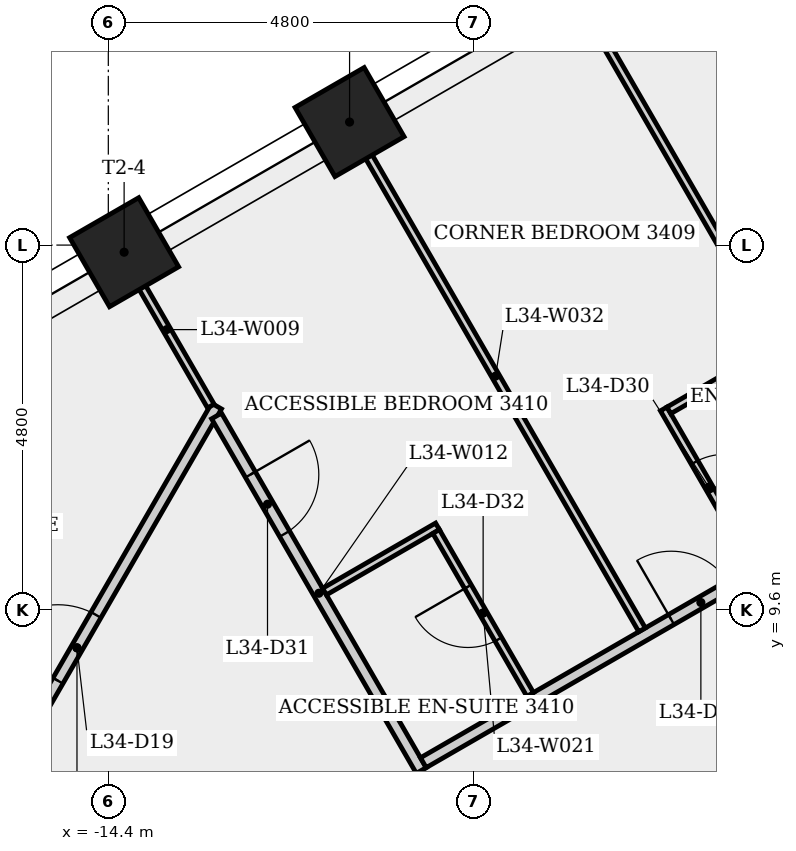
"""IFC4 building model, lengths in metres.
Left out: names, types, materials, properties, quantities, classifications, styles, units other than length and angle.
Written with IfcOpenShell. Run it as: python <this file> out.ifc"""

import sys

from ifc_helpers import new_model, si_unit, direction, frame, frame_2d, origin, origin_2d, place, context, subcontext, project, spatial, rectangle, extrude, element, fill, save


model = new_model("IFC4")
c1 = context("Model", 3, precision=1e-05, world=origin(), true_north=direction((0.0, 1.0)))
c2 = subcontext(c1, "Body", "Model", "MODEL_VIEW")
j1 = project(units=[si_unit("LENGTHUNIT", "METRE"), si_unit("PLANEANGLEUNIT", "RADIAN")], contexts=[c1])
p1 = place(None, origin())
s1 = spatial("IfcSite", under=j1, at=p1, CompositionType="ELEMENT")
p2 = place(p1, origin())
s2 = spatial("IfcBuilding", under=s1, at=p2, CompositionType="ELEMENT")
p3 = place(p2, frame((0.0, 0.0, 128.5)))
s3 = spatial("IfcBuildingStorey", under=s2, at=p3, CompositionType="ELEMENT", Elevation=128.5)
p4 = place(p3, frame((0.175, 10.667, 0.0), z_axis=(0.0, 0.0, 1.0), x_axis=(-0.866023993627, -0.500002442456, 0.0)))
e1 = element("IfcWall", 1, at=p4, inside=s3, PredefinedType="SHEAR", context=c2, shape_type="SweptSolid", body=[
    extrude(rectangle(XDim=10.97, YDim=0.7, at=frame_2d((5.485, 0.0))), origin(), (0.0, 0.0, 1.0), 4.0),
])
p5 = place(p4, frame((9.254, 0.0, 0.0)))
e2 = element("IfcOpeningElement", 2, at=p5, cuts=e1, PredefinedType="OPENING", context=c2, shape_type="SweptSolid", body=[
    extrude(rectangle(XDim=0.9, YDim=2.1, at=frame_2d((0.45, 1.05))), frame((0.0, 0.36, 0.0), z_axis=(0.0, -1.0, 0.0), x_axis=(1.0, 0.0, 0.0)), (0.0, 0.0, 1.0), 0.72),
])
p6 = place(p4, frame((2.033, 0.0, 0.0)))
e3 = element("IfcOpeningElement", 3, at=p6, cuts=e1, PredefinedType="OPENING", context=c2, shape_type="SweptSolid", body=[
    extrude(rectangle(XDim=0.9, YDim=2.1, at=frame_2d((0.45, 1.05))), frame((0.0, 0.36, 0.0), z_axis=(0.0, -1.0, 0.0), x_axis=(1.0, 0.0, 0.0)), (0.0, 0.0, 1.0), 0.72),
])
for number, where, z_axis, x_axis in (
    (4, (-11.226, 16.019, 0.0), (0.0, 0.0, 1.0), (-0.5, 0.866, 0.0)),
    (5, (-14.192, 14.306, 0.0), (0.0, 0.0, 1.0), (-0.5, 0.866, 0.0)),
):
    element("IfcColumn", number, at=place(p3, frame(where, z_axis=z_axis, x_axis=x_axis)), inside=s3, PredefinedType="COLUMN", context=c2, shape_type="SweptSolid", body=[
        extrude(rectangle(XDim=1.05, YDim=1.05, at=origin_2d()), origin(), (0.0, 0.0, 1.0), 4.0),
    ])
p7 = place(p3, frame((-16.649, 5.92, 0.0), z_axis=(0.0, 0.0, 1.0), x_axis=(0.500003458512, 0.866023407002, 0.0)))
e6 = element("IfcWall", 6, at=p7, inside=s3, PredefinedType="PARTITIONING", context=c2, shape_type="SweptSolid", body=[
    extrude(rectangle(XDim=7.345, YDim=0.15, at=frame_2d((3.673, 0.0))), origin(), (0.0, 0.0, 1.0), 3.65),
])
p8 = place(p7, frame((3.173, 0.0, 0.0)))
e7 = element("IfcOpeningElement", 7, at=p8, cuts=e6, PredefinedType="OPENING", context=c2, shape_type="SweptSolid", body=[
    extrude(rectangle(XDim=1.0, YDim=2.1, at=frame_2d((0.5, 1.05))), frame((0.0, 0.085, 0.0), z_axis=(0.0, -1.0, 0.0), x_axis=(1.0, 0.0, 0.0)), (0.0, 0.0, 1.0), 0.17),
])
p9 = place(p3, frame((-14.213, 14.294, 0.0), z_axis=(0.0, 0.0, 1.0), x_axis=(0.499946767237, -0.866056135553, 0.0)))
e8 = element("IfcWall", 8, at=p9, inside=s3, PredefinedType="PARTITIONING", context=c2, shape_type="SweptSolid", body=[
    extrude(rectangle(XDim=2.324, YDim=0.1, at=frame_2d((1.162, 0.0))), origin(), (0.0, 0.0, 1.0), 3.65),
])
p10 = place(p3, frame((-12.976, 12.152, 0.0), z_axis=(0.0, 0.0, 1.0), x_axis=(0.500019321912, -0.866014247986, 0.0)))
e9 = element("IfcWall", 9, at=p10, inside=s3, PredefinedType="PARTITIONING", context=c2, shape_type="SweptSolid", body=[
    extrude(rectangle(XDim=5.386, YDim=0.15, at=frame_2d((2.693, 0.0))), origin(), (0.0, 0.0, 1.0), 3.65),
])
p11 = place(p10, frame((0.891, 0.0, 0.0)))
e10 = element("IfcOpeningElement", 10, at=p11, cuts=e9, PredefinedType="OPENING", context=c2, shape_type="SweptSolid", body=[
    extrude(rectangle(XDim=0.9, YDim=2.1, at=frame_2d((0.45, 1.05))), frame((0.0, 0.085, 0.0), z_axis=(0.0, -1.0, 0.0), x_axis=(1.0, 0.0, 0.0)), (0.0, 0.0, 1.0), 0.17),
])
p12 = place(p3, frame((-10.255, 7.589, 0.0), z_axis=(0.0, 0.0, 1.0), x_axis=(0.866015055687, 0.500017923002, 0.0)))
e11 = element("IfcWall", 11, at=p12, inside=s3, PredefinedType="PARTITIONING", context=c2, shape_type="SweptSolid", body=[
    extrude(rectangle(XDim=10.323, YDim=0.15, at=frame_2d((5.162, 0.0))), origin(), (0.0, 0.0, 1.0), 3.65),
])
p13 = place(p12, frame((3.766, 0.0, 0.0)))
e12 = element("IfcOpeningElement", 12, at=p13, cuts=e11, PredefinedType="OPENING", context=c2, shape_type="SweptSolid", body=[
    extrude(rectangle(XDim=0.9, YDim=2.1, at=frame_2d((0.45, 1.05))), frame((0.0, 0.085, 0.0), z_axis=(0.0, -1.0, 0.0), x_axis=(1.0, 0.0, 0.0)), (0.0, 0.0, 1.0), 0.17),
])
p14 = place(p3, frame((-10.069, 10.699, 0.0), z_axis=(0.0, 0.0, 1.0), x_axis=(-0.865984193376, -0.500071371729, 0.0)))
e13 = element("IfcWall", 13, at=p14, inside=s3, PredefinedType="PARTITIONING", context=c2, shape_type="SweptSolid", body=[
    extrude(rectangle(XDim=1.716, YDim=0.1, at=frame_2d((0.858, 0.0))), origin(), (0.0, 0.0, 1.0), 3.65),
])
p15 = place(p3, frame((-8.85, 8.487, 0.0), z_axis=(0.0, 0.0, 1.0), x_axis=(-0.500032699561, 0.866006523861, 0.0)))
e14 = element("IfcWall", 14, at=p15, inside=s3, PredefinedType="PARTITIONING", context=c2, shape_type="SweptSolid", body=[
    extrude(rectangle(XDim=2.475, YDim=0.1, at=frame_2d((1.237, 0.0))), origin(), (0.0, 0.0, 1.0), 3.65),
])
p16 = place(p15, frame((0.837, 0.0, 0.0)))
e15 = element("IfcOpeningElement", 15, at=p16, cuts=e14, PredefinedType="OPENING", context=c2, shape_type="SweptSolid", body=[
    extrude(rectangle(XDim=0.8, YDim=2.1, at=frame_2d((0.4, 1.05))), frame((0.0, 0.06, 0.0), z_axis=(0.0, -1.0, 0.0), x_axis=(1.0, 0.0, 0.0)), (0.0, 0.0, 1.0), 0.12),
])
p17 = place(p3, frame((-7.378, 9.337, 0.0), z_axis=(0.0, 0.0, 1.0), x_axis=(-0.499997453958, 0.866026873738, 0.0)))
e16 = element("IfcWall", 16, at=p17, inside=s3, PredefinedType="PARTITIONING", context=c2, shape_type="SweptSolid", body=[
    extrude(rectangle(XDim=7.71, YDim=0.1, at=frame_2d((3.855, 0.0))), origin(), (0.0, 0.0, 1.0), 3.65),
])
p18 = place(p3, frame((-7.093, 12.244, 0.0), z_axis=(0.0, 0.0, 1.0), x_axis=(0.500030943131, -0.866007538022, 0.0)))
e17 = element("IfcWall", 17, at=p18, inside=s3, PredefinedType="PARTITIONING", context=c2, shape_type="SweptSolid", body=[
    extrude(rectangle(XDim=2.375, YDim=0.1, at=frame_2d((1.188, 0.0))), origin(), (0.0, 0.0, 1.0), 3.65),
])
p19 = place(p18, frame((0.812, 0.0, 0.0)))
e18 = element("IfcOpeningElement", 18, at=p19, cuts=e17, PredefinedType="OPENING", context=c2, shape_type="SweptSolid", body=[
    extrude(rectangle(XDim=0.8, YDim=2.1, at=frame_2d((0.4, 1.05))), frame((0.0, 0.06, 0.0), z_axis=(0.0, -1.0, 0.0), x_axis=(1.0, 0.0, 0.0)), (0.0, 0.0, 1.0), 0.12),
])
p20 = place(p3, frame((-5.603, 13.046, 0.0), z_axis=(0.0, 0.0, 1.0), x_axis=(-0.866009679343, -0.500027234542, 0.0)))
e19 = element("IfcWall", 19, at=p20, inside=s3, PredefinedType="PARTITIONING", context=c2, shape_type="SweptSolid", body=[
    extrude(rectangle(XDim=1.641, YDim=0.1, at=frame_2d((0.821, 0.0))), origin(), (0.0, 0.0, 1.0), 3.65),
])
p21 = place(p3, frame((-8.253, 17.735, 0.0), z_axis=(0.0, 0.0, 1.0), x_axis=(0.499983743644, -0.866034789193, 0.0)))
e20 = element("IfcWall", 20, at=p21, inside=s3, PredefinedType="PARTITIONING", context=c2, shape_type="SweptSolid", body=[
    extrude(rectangle(XDim=7.711, YDim=0.1, at=frame_2d((3.855, 0.0))), origin(), (0.0, 0.0, 1.0), 3.65),
])
p22 = place(p8, origin())
e21 = element("IfcDoor", 21, at=p22, inside=s3, OperationType="SINGLE_SWING_LEFT", PredefinedType="DOOR", context=c2, shape_type="SweptSolid", body=[
    extrude(rectangle(XDim=1.0, YDim=2.1, at=frame_2d((0.5, 1.05))), frame((0.0, 0.025, 0.0), z_axis=(0.0, -1.0, 0.0), x_axis=(1.0, 0.0, 0.0)), (0.0, 0.0, 1.0), 0.05),
])
fill(e7, e21)
p23 = place(p13, origin())
e22 = element("IfcDoor", 22, at=p23, inside=s3, OperationType="SINGLE_SWING_LEFT", PredefinedType="DOOR", context=c2, shape_type="SweptSolid", body=[
    extrude(rectangle(XDim=0.9, YDim=2.1, at=frame_2d((0.45, 1.05))), frame((0.0, 0.025, 0.0), z_axis=(0.0, -1.0, 0.0), x_axis=(1.0, 0.0, 0.0)), (0.0, 0.0, 1.0), 0.05),
])
fill(e12, e22)
p24 = place(p19, origin())
e23 = element("IfcDoor", 23, at=p24, inside=s3, OperationType="SINGLE_SWING_RIGHT", PredefinedType="DOOR", context=c2, shape_type="SweptSolid", body=[
    extrude(rectangle(XDim=0.8, YDim=2.1, at=frame_2d((0.4, 1.05))), frame((0.0, 0.025, 0.0), z_axis=(0.0, -1.0, 0.0), x_axis=(1.0, 0.0, 0.0)), (0.0, 0.0, 1.0), 0.05),
])
fill(e18, e23)
p25 = place(p11, origin())
e24 = element("IfcDoor", 24, at=p25, inside=s3, OperationType="SINGLE_SWING_LEFT", PredefinedType="DOOR", context=c2, shape_type="SweptSolid", body=[
    extrude(rectangle(XDim=0.9, YDim=2.1, at=frame_2d((0.45, 1.05))), frame((0.0, 0.025, 0.0), z_axis=(0.0, -1.0, 0.0), x_axis=(1.0, 0.0, 0.0)), (0.0, 0.0, 1.0), 0.05),
])
fill(e10, e24)
p26 = place(p16, origin())
e25 = element("IfcDoor", 25, at=p26, inside=s3, OperationType="SINGLE_SWING_RIGHT", PredefinedType="DOOR", context=c2, shape_type="SweptSolid", body=[
    extrude(rectangle(XDim=0.8, YDim=2.1, at=frame_2d((0.4, 1.05))), frame((0.0, 0.025, 0.0), z_axis=(0.0, -1.0, 0.0), x_axis=(1.0, 0.0, 0.0)), (0.0, 0.0, 1.0), 0.05),
])
fill(e15, e25)
save(model, sys.argv[1])
